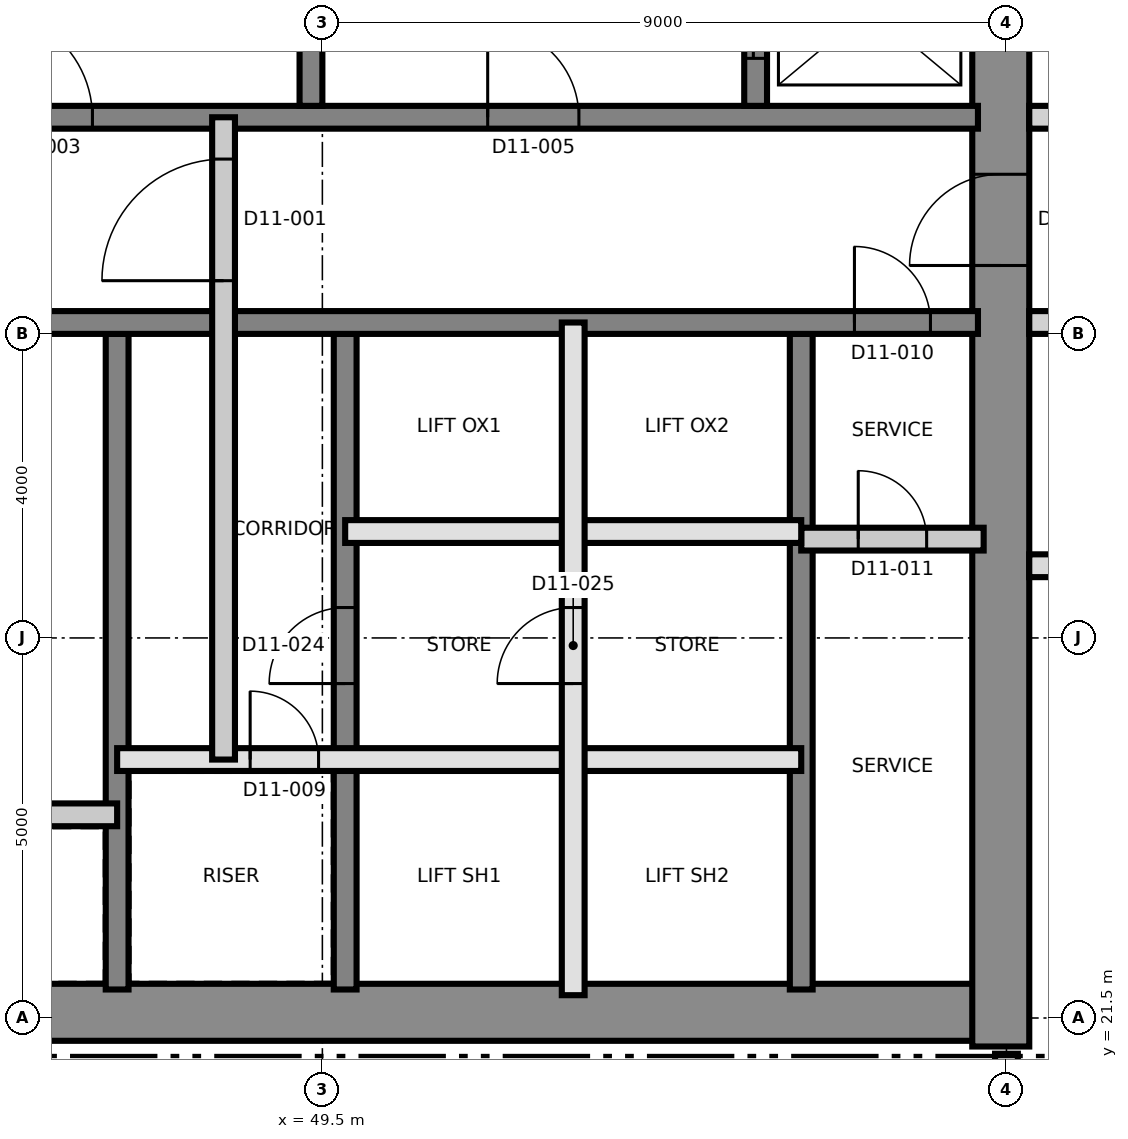
"""IFC4 building model, lengths in metres.
Left out: names, types, materials, properties, quantities, classifications, styles, units other than length and angle.
Written with IfcOpenShell. Run it as: python <this file> out.ifc"""

import sys

from ifc_helpers import new_model, si_unit, direction, frame, frame_2d, origin, place, context, subcontext, project, spatial, rectangle, extrude, element, fill, save


model = new_model("IFC4")
c1 = context("Model", 3, precision=1e-05, world=origin(), true_north=direction((0.0, 1.0)))
c2 = subcontext(c1, "Body", "Model", "MODEL_VIEW")
j1 = project(units=[si_unit("LENGTHUNIT", "METRE"), si_unit("PLANEANGLEUNIT", "RADIAN")], contexts=[c1])
p1 = place(None, origin())
s1 = spatial("IfcSite", under=j1, at=p1, CompositionType="ELEMENT")
p2 = place(p1, origin())
s2 = spatial("IfcBuilding", under=s1, at=p2, CompositionType="ELEMENT")
p3 = place(p2, frame((0.0, 0.0, 127.8)))
s3 = spatial("IfcBuildingStorey", under=s2, at=p3, CompositionType="ELEMENT", Elevation=127.8)
p4 = place(p3, frame((31.125, 21.575, 0.0), z_axis=(0.0, 0.0, 1.0), x_axis=(1.0, 0.0, 0.0)))
e1 = element("IfcWall", 1, at=p4, inside=s3, PredefinedType="SHEAR", context=c2, shape_type="SweptSolid", body=[
    extrude(rectangle(XDim=27.0, YDim=0.75, at=frame_2d((13.5, 0.0))), origin(), (0.0, 0.0, 1.0), 3.7),
])
p5 = place(p3, frame((58.425, 21.125, 0.0), z_axis=(0.0, 0.0, 1.0), x_axis=(0.0, 1.0, 0.0)))
e2 = element("IfcWall", 2, at=p5, inside=s3, PredefinedType="SHEAR", context=c2, shape_type="SweptSolid", body=[
    extrude(rectangle(XDim=18.75, YDim=0.75, at=frame_2d((9.375, 0.0))), origin(), (0.0, 0.0, 1.0), 3.7),
])
p6 = place(p5, frame((10.275, 0.0, 0.0)))
e3 = element("IfcOpeningElement", 3, at=p6, cuts=e2, PredefinedType="OPENING", context=c2, shape_type="SweptSolid", body=[
    extrude(rectangle(XDim=1.2, YDim=2.1, at=frame_2d((0.6, 1.05))), frame((0.0, 0.385, 0.0), z_axis=(0.0, -1.0, 0.0), x_axis=(1.0, 0.0, 0.0)), (0.0, 0.0, 1.0), 0.77),
])
p7 = place(p3, frame((46.8, 21.875, 0.0), z_axis=(0.0, 0.0, 1.0), x_axis=(0.0, 1.0, 0.0)))
e4 = element("IfcWall", 4, at=p7, inside=s3, PredefinedType="SHEAR", context=c2, shape_type="SweptSolid", body=[
    extrude(rectangle(XDim=8.625, YDim=0.3, at=frame_2d((4.312, 0.0))), origin(), (0.0, 0.0, 1.0), 3.7),
])
p8 = place(p3, frame((49.8, 21.875, 0.0), z_axis=(0.0, 0.0, 1.0), x_axis=(0.0, 1.0, 0.0)))
e5 = element("IfcWall", 5, at=p8, inside=s3, PredefinedType="SHEAR", context=c2, shape_type="SweptSolid", body=[
    extrude(rectangle(XDim=8.625, YDim=0.3, at=frame_2d((4.312, 0.0))), origin(), (0.0, 0.0, 1.0), 3.7),
])
p9 = place(p8, frame((4.025, 0.0, 0.0)))
e6 = element("IfcOpeningElement", 6, at=p9, cuts=e5, PredefinedType="OPENING", context=c2, shape_type="SweptSolid", body=[
    extrude(rectangle(XDim=1.0, YDim=2.1, at=frame_2d((0.5, 1.05))), frame((0.0, 0.16, 0.0), z_axis=(0.0, -1.0, 0.0), x_axis=(1.0, 0.0, 0.0)), (0.0, 0.0, 1.0), 0.32),
])
p10 = place(p3, frame((55.8, 21.875, 0.0), z_axis=(0.0, 0.0, 1.0), x_axis=(0.0, 1.0, 0.0)))
e7 = element("IfcWall", 7, at=p10, inside=s3, PredefinedType="SHEAR", context=c2, shape_type="SweptSolid", body=[
    extrude(rectangle(XDim=8.625, YDim=0.3, at=frame_2d((4.312, 0.0))), origin(), (0.0, 0.0, 1.0), 3.7),
])
p11 = place(p3, frame((31.875, 30.65, 0.0), z_axis=(0.0, 0.0, 1.0), x_axis=(1.0, 0.0, 0.0)))
e8 = element("IfcWall", 8, at=p11, inside=s3, PredefinedType="SHEAR", context=c2, shape_type="SweptSolid", body=[
    extrude(rectangle(XDim=26.25, YDim=0.3, at=frame_2d((13.125, 0.0))), origin(), (0.0, 0.0, 1.0), 3.7),
])
p12 = place(p11, frame((24.625, 0.0, 0.0)))
e9 = element("IfcOpeningElement", 9, at=p12, cuts=e8, PredefinedType="OPENING", context=c2, shape_type="SweptSolid", body=[
    extrude(rectangle(XDim=1.0, YDim=2.1, at=frame_2d((0.5, 1.05))), frame((0.0, 0.16, 0.0), z_axis=(0.0, -1.0, 0.0), x_axis=(1.0, 0.0, 0.0)), (0.0, 0.0, 1.0), 0.32),
])
p13 = place(p11, frame((11.425, 0.0, 0.0)))
e10 = element("IfcOpeningElement", 10, at=p13, cuts=e8, PredefinedType="OPENING", context=c2, shape_type="SweptSolid", body=[
    extrude(rectangle(XDim=1.0, YDim=2.1, at=frame_2d((0.5, 1.05))), frame((0.0, 0.16, 0.0), z_axis=(0.0, -1.0, 0.0), x_axis=(1.0, 0.0, 0.0)), (0.0, 0.0, 1.0), 0.32),
])
p14 = place(p3, frame((31.875, 33.35, 0.0), z_axis=(0.0, 0.0, 1.0), x_axis=(1.0, 0.0, 0.0)))
e11 = element("IfcWall", 11, at=p14, inside=s3, PredefinedType="SHEAR", context=c2, shape_type="SweptSolid", body=[
    extrude(rectangle(XDim=26.25, YDim=0.3, at=frame_2d((13.125, 0.0))), origin(), (0.0, 0.0, 1.0), 3.7),
])
p15 = place(p14, frame((13.2, 0.0, 0.0)))
e12 = element("IfcOpeningElement", 12, at=p15, cuts=e11, PredefinedType="OPENING", context=c2, shape_type="SweptSolid", body=[
    extrude(rectangle(XDim=1.4, YDim=2.1, at=frame_2d((0.7, 1.05))), frame((0.0, 0.16, 0.0), z_axis=(0.0, -1.0, 0.0), x_axis=(1.0, 0.0, 0.0)), (0.0, 0.0, 1.0), 0.32),
])
p16 = place(p14, frame((5.25, 0.0, 0.0)))
e13 = element("IfcOpeningElement", 13, at=p16, cuts=e11, PredefinedType="OPENING", context=c2, shape_type="SweptSolid", body=[
    extrude(rectangle(XDim=1.2, YDim=2.1, at=frame_2d((0.6, 1.05))), frame((0.0, 0.16, 0.0), z_axis=(0.0, -1.0, 0.0), x_axis=(1.0, 0.0, 0.0)), (0.0, 0.0, 1.0), 0.32),
])
p17 = place(p14, frame((19.8, 0.0, 0.0)))
e14 = element("IfcOpeningElement", 14, at=p17, cuts=e11, PredefinedType="OPENING", context=c2, shape_type="SweptSolid", body=[
    extrude(rectangle(XDim=1.2, YDim=2.1, at=frame_2d((0.6, 1.05))), frame((0.0, 0.16, 0.0), z_axis=(0.0, -1.0, 0.0), x_axis=(1.0, 0.0, 0.0)), (0.0, 0.0, 1.0), 0.32),
])
p18 = place(p3, frame((49.35, 33.5, 0.0), z_axis=(0.0, 0.0, 1.0), x_axis=(0.0, 1.0, 0.0)))
e15 = element("IfcWall", 15, at=p18, inside=s3, PredefinedType="SHEAR", context=c2, shape_type="SweptSolid", body=[
    extrude(rectangle(XDim=5.625, YDim=0.3, at=frame_2d((2.812, 0.0))), origin(), (0.0, 0.0, 1.0), 3.7),
])
p19 = place(p3, frame((55.2, 33.5, 0.0), z_axis=(0.0, 0.0, 1.0), x_axis=(0.0, 1.0, 0.0)))
e16 = element("IfcWall", 16, at=p19, inside=s3, PredefinedType="SHEAR", context=c2, shape_type="SweptSolid", body=[
    extrude(rectangle(XDim=2.55, YDim=0.3, at=frame_2d((1.275, 0.0))), origin(), (0.0, 0.0, 1.0), 3.7),
])
p20 = place(p19, frame((0.625, 0.0, 0.0)))
e17 = element("IfcOpeningElement", 17, at=p20, cuts=e16, PredefinedType="OPENING", context=c2, shape_type="SweptSolid", body=[
    extrude(rectangle(XDim=1.3, YDim=2.4, at=frame_2d((0.65, 1.2))), frame((0.0, 0.16, 0.0), z_axis=(0.0, -1.0, 0.0), x_axis=(1.0, 0.0, 0.0)), (0.0, 0.0, 1.0), 0.32),
])
p21 = place(p3, frame((40.8, 24.173, 0.0), z_axis=(0.0, 0.0, 1.0), x_axis=(1.0, 0.0, 0.0)))
e18 = element("IfcWall", 18, at=p21, inside=s3, PredefinedType="PARTITIONING", context=c2, shape_type="SweptSolid", body=[
    extrude(rectangle(XDim=6.0, YDim=0.3, at=frame_2d((3.0, 0.0))), origin(), (0.0, 0.0, 1.0), 3.4),
])
p22 = place(p21, frame((2.5, 0.0, 0.0)))
e19 = element("IfcOpeningElement", 19, at=p22, cuts=e18, PredefinedType="OPENING", context=c2, shape_type="SweptSolid", body=[
    extrude(rectangle(XDim=1.0, YDim=2.1, at=frame_2d((0.5, 1.05))), frame((0.0, 0.16, 0.0), z_axis=(0.0, -1.0, 0.0), x_axis=(1.0, 0.0, 0.0)), (0.0, 0.0, 1.0), 0.32),
])
p23 = place(p3, frame((46.8, 24.9, 0.0), z_axis=(0.0, 0.0, 1.0), x_axis=(1.0, 0.0, 0.0)))
e20 = element("IfcWall", 20, at=p23, inside=s3, PredefinedType="SOLIDWALL", context=c2, shape_type="SweptSolid", body=[
    extrude(rectangle(XDim=9.0, YDim=0.3, at=frame_2d((4.5, 0.0))), origin(), (0.0, 0.0, 1.0), 3.4),
])
p24 = place(p23, frame((1.75, 0.0, 0.0)))
e21 = element("IfcOpeningElement", 21, at=p24, cuts=e20, PredefinedType="OPENING", context=c2, shape_type="SweptSolid", body=[
    extrude(rectangle(XDim=0.9, YDim=2.1, at=frame_2d((0.45, 1.05))), frame((0.0, 0.16, 0.0), z_axis=(0.0, -1.0, 0.0), x_axis=(1.0, 0.0, 0.0)), (0.0, 0.0, 1.0), 0.32),
])
p25 = place(p3, frame((55.8, 27.8, 0.0), z_axis=(0.0, 0.0, 1.0), x_axis=(1.0, 0.0, 0.0)))
e22 = element("IfcWall", 22, at=p25, inside=s3, PredefinedType="PARTITIONING", context=c2, shape_type="SweptSolid", body=[
    extrude(rectangle(XDim=2.4, YDim=0.3, at=frame_2d((1.2, 0.0))), origin(), (0.0, 0.0, 1.0), 3.4),
])
p26 = place(p25, frame((0.75, 0.0, 0.0)))
e23 = element("IfcOpeningElement", 23, at=p26, cuts=e22, PredefinedType="OPENING", context=c2, shape_type="SweptSolid", body=[
    extrude(rectangle(XDim=0.9, YDim=2.1, at=frame_2d((0.45, 1.05))), frame((0.0, 0.16, 0.0), z_axis=(0.0, -1.0, 0.0), x_axis=(1.0, 0.0, 0.0)), (0.0, 0.0, 1.0), 0.32),
])
p27 = place(p3, frame((49.8, 27.9, 0.0), z_axis=(0.0, 0.0, 1.0), x_axis=(1.0, 0.0, 0.0)))
e24 = element("IfcWall", 24, at=p27, inside=s3, PredefinedType="SOLIDWALL", context=c2, shape_type="SweptSolid", body=[
    extrude(rectangle(XDim=6.0, YDim=0.3, at=frame_2d((3.0, 0.0))), origin(), (0.0, 0.0, 1.0), 3.4),
])
p28 = place(p3, frame((48.2, 24.9, 0.0), z_axis=(0.0, 0.0, 1.0), x_axis=(0.0, 1.0, 0.0)))
e25 = element("IfcWall", 25, at=p28, inside=s3, PredefinedType="PARTITIONING", context=c2, shape_type="SweptSolid", body=[
    extrude(rectangle(XDim=8.45, YDim=0.3, at=frame_2d((4.225, 0.0))), origin(), (0.0, 0.0, 1.0), 3.4),
])
p29 = place(p28, frame((6.3, 0.0, 0.0)))
e26 = element("IfcOpeningElement", 26, at=p29, cuts=e25, PredefinedType="OPENING", context=c2, shape_type="SweptSolid", body=[
    extrude(rectangle(XDim=1.6, YDim=2.1, at=frame_2d((0.8, 1.05))), frame((0.0, 0.16, 0.0), z_axis=(0.0, -1.0, 0.0), x_axis=(1.0, 0.0, 0.0)), (0.0, 0.0, 1.0), 0.32),
])
p30 = place(p3, frame((52.8, 21.8, 0.0), z_axis=(0.0, 0.0, 1.0), x_axis=(0.0, 1.0, 0.0)))
e27 = element("IfcWall", 27, at=p30, inside=s3, PredefinedType="SOLIDWALL", context=c2, shape_type="SweptSolid", body=[
    extrude(rectangle(XDim=8.85, YDim=0.3, at=frame_2d((4.425, 0.0))), origin(), (0.0, 0.0, 1.0), 3.4),
])
p31 = place(p30, frame((4.1, 0.0, 0.0)))
e28 = element("IfcOpeningElement", 28, at=p31, cuts=e27, PredefinedType="OPENING", context=c2, shape_type="SweptSolid", body=[
    extrude(rectangle(XDim=1.0, YDim=2.1, at=frame_2d((0.5, 1.05))), frame((0.0, 0.16, 0.0), z_axis=(0.0, -1.0, 0.0), x_axis=(1.0, 0.0, 0.0)), (0.0, 0.0, 1.0), 0.32),
])
p32 = place(p3, frame((58.8, 27.45, 0.0), z_axis=(0.0, 0.0, 1.0), x_axis=(1.0, 0.0, 0.0)))
e29 = element("IfcWall", 29, at=p32, inside=s3, PredefinedType="PARTITIONING", context=c2, shape_type="SweptSolid", body=[
    extrude(rectangle(XDim=2.4, YDim=0.3, at=frame_2d((1.2, 0.0))), origin(), (0.0, 0.0, 1.0), 3.4),
])
p33 = place(p32, frame((0.65, 0.0, 0.0)))
e30 = element("IfcOpeningElement", 30, at=p33, cuts=e29, PredefinedType="OPENING", context=c2, shape_type="SweptSolid", body=[
    extrude(rectangle(XDim=0.8, YDim=2.1, at=frame_2d((0.4, 1.05))), frame((0.0, 0.16, 0.0), z_axis=(0.0, -1.0, 0.0), x_axis=(1.0, 0.0, 0.0)), (0.0, 0.0, 1.0), 0.32),
])
p34 = place(p3, frame((58.8, 30.65, 0.0), z_axis=(0.0, 0.0, 1.0), x_axis=(1.0, 0.0, 0.0)))
e31 = element("IfcWall", 31, at=p34, inside=s3, PredefinedType="PARTITIONING", context=c2, shape_type="SweptSolid", body=[
    extrude(rectangle(XDim=26.53, YDim=0.3, at=frame_2d((13.265, 0.0))), origin(), (0.0, 0.0, 1.0), 3.4),
])
p35 = place(p34, frame((3.115, 0.0, 0.0)))
e32 = element("IfcOpeningElement", 32, at=p35, cuts=e31, PredefinedType="OPENING", context=c2, shape_type="SweptSolid", body=[
    extrude(rectangle(XDim=1.0, YDim=2.1, at=frame_2d((0.5, 1.05))), frame((0.0, 0.16, 0.0), z_axis=(0.0, -1.0, 0.0), x_axis=(1.0, 0.0, 0.0)), (0.0, 0.0, 1.0), 0.32),
])
p36 = place(p34, frame((6.065, 0.0, 0.0)))
e33 = element("IfcOpeningElement", 33, at=p36, cuts=e31, PredefinedType="OPENING", context=c2, shape_type="SweptSolid", body=[
    extrude(rectangle(XDim=1.4, YDim=2.1, at=frame_2d((0.7, 1.05))), frame((0.0, 0.16, 0.0), z_axis=(0.0, -1.0, 0.0), x_axis=(1.0, 0.0, 0.0)), (0.0, 0.0, 1.0), 0.32),
])
p37 = place(p34, frame((12.7, 0.0, 0.0)))
e34 = element("IfcOpeningElement", 34, at=p37, cuts=e31, PredefinedType="OPENING", context=c2, shape_type="SweptSolid", body=[
    extrude(rectangle(XDim=1.0, YDim=2.4, at=frame_2d((0.5, 1.2))), frame((0.0, 0.16, 0.0), z_axis=(0.0, -1.0, 0.0), x_axis=(1.0, 0.0, 0.0)), (0.0, 0.0, 1.0), 0.32),
])
p38 = place(p34, frame((18.85, 0.0, 0.0)))
e35 = element("IfcOpeningElement", 35, at=p38, cuts=e31, PredefinedType="OPENING", context=c2, shape_type="SweptSolid", body=[
    extrude(rectangle(XDim=1.0, YDim=2.1, at=frame_2d((0.5, 1.05))), frame((0.0, 0.16, 0.0), z_axis=(0.0, -1.0, 0.0), x_axis=(1.0, 0.0, 0.0)), (0.0, 0.0, 1.0), 0.32),
])
p39 = place(p34, frame((24.7, 0.0, 0.0)))
e36 = element("IfcOpeningElement", 36, at=p39, cuts=e31, PredefinedType="OPENING", context=c2, shape_type="SweptSolid", body=[
    extrude(rectangle(XDim=1.0, YDim=2.1, at=frame_2d((0.5, 1.05))), frame((0.0, 0.16, 0.0), z_axis=(0.0, -1.0, 0.0), x_axis=(1.0, 0.0, 0.0)), (0.0, 0.0, 1.0), 0.32),
])
p40 = place(p3, frame((58.8, 33.35, 0.0), z_axis=(0.0, 0.0, 1.0), x_axis=(1.0, 0.0, 0.0)))
e37 = element("IfcWall", 37, at=p40, inside=s3, PredefinedType="PARTITIONING", context=c2, shape_type="SweptSolid", body=[
    extrude(rectangle(XDim=26.53, YDim=0.3, at=frame_2d((13.265, 0.0))), origin(), (0.0, 0.0, 1.0), 3.4),
])
p41 = place(p40, frame((0.835, 0.0, 0.0)))
e38 = element("IfcOpeningElement", 38, at=p41, cuts=e37, PredefinedType="OPENING", context=c2, shape_type="SweptSolid", body=[
    extrude(rectangle(XDim=1.2, YDim=2.1, at=frame_2d((0.6, 1.05))), frame((0.0, 0.16, 0.0), z_axis=(0.0, -1.0, 0.0), x_axis=(1.0, 0.0, 0.0)), (0.0, 0.0, 1.0), 0.32),
])
p42 = place(p40, frame((4.085, 0.0, 0.0)))
e39 = element("IfcOpeningElement", 39, at=p42, cuts=e37, PredefinedType="OPENING", context=c2, shape_type="SweptSolid", body=[
    extrude(rectangle(XDim=1.0, YDim=2.1, at=frame_2d((0.5, 1.05))), frame((0.0, 0.16, 0.0), z_axis=(0.0, -1.0, 0.0), x_axis=(1.0, 0.0, 0.0)), (0.0, 0.0, 1.0), 0.32),
])
p43 = place(p40, frame((12.7, 0.0, 0.0)))
e40 = element("IfcOpeningElement", 40, at=p43, cuts=e37, PredefinedType="OPENING", context=c2, shape_type="SweptSolid", body=[
    extrude(rectangle(XDim=1.0, YDim=2.4, at=frame_2d((0.5, 1.2))), frame((0.0, 0.16, 0.0), z_axis=(0.0, -1.0, 0.0), x_axis=(1.0, 0.0, 0.0)), (0.0, 0.0, 1.0), 0.32),
])
p44 = place(p40, frame((21.115, 0.0, 0.0)))
e41 = element("IfcOpeningElement", 41, at=p44, cuts=e37, PredefinedType="OPENING", context=c2, shape_type="SweptSolid", body=[
    extrude(rectangle(XDim=1.0, YDim=2.1, at=frame_2d((0.5, 1.05))), frame((0.0, 0.16, 0.0), z_axis=(0.0, -1.0, 0.0), x_axis=(1.0, 0.0, 0.0)), (0.0, 0.0, 1.0), 0.32),
])
p45 = place(p40, frame((24.065, 0.0, 0.0)))
e42 = element("IfcOpeningElement", 42, at=p45, cuts=e37, PredefinedType="OPENING", context=c2, shape_type="SweptSolid", body=[
    extrude(rectangle(XDim=1.4, YDim=2.1, at=frame_2d((0.7, 1.05))), frame((0.0, 0.16, 0.0), z_axis=(0.0, -1.0, 0.0), x_axis=(1.0, 0.0, 0.0)), (0.0, 0.0, 1.0), 0.32),
])
p46 = place(p3, frame((58.5, 20.135, 0.0), z_axis=(0.0, 0.0, 1.0), x_axis=(0.0, 1.0, 0.0)))
e43 = element("IfcWall", 43, at=p46, inside=s3, PredefinedType="PARTITIONING", context=c2, shape_type="SweptSolid", body=[
    extrude(rectangle(XDim=0.895, YDim=0.3, at=frame_2d((0.448, 0.0))), origin(), (0.0, 0.0, 1.0), 3.4),
])
p47 = place(p29, origin())
e44 = element("IfcDoor", 44, at=p47, inside=s3, OperationType="SINGLE_SWING_LEFT", PredefinedType="DOOR", context=c2, shape_type="SweptSolid", body=[
    extrude(rectangle(XDim=1.6, YDim=2.1, at=frame_2d((0.8, 1.05))), frame((0.0, 0.025, 0.0), z_axis=(0.0, -1.0, 0.0), x_axis=(1.0, 0.0, 0.0)), (0.0, 0.0, 1.0), 0.05),
])
fill(e26, e44)
p48 = place(p15, origin())
e45 = element("IfcDoor", 45, at=p48, inside=s3, OperationType="SINGLE_SWING_RIGHT", PredefinedType="DOOR", context=c2, shape_type="SweptSolid", body=[
    extrude(rectangle(XDim=1.4, YDim=2.1, at=frame_2d((0.7, 1.05))), frame((0.0, 0.025, 0.0), z_axis=(0.0, -1.0, 0.0), x_axis=(1.0, 0.0, 0.0)), (0.0, 0.0, 1.0), 0.05),
])
fill(e12, e45)
p49 = place(p17, origin())
e46 = element("IfcDoor", 46, at=p49, inside=s3, OperationType="SINGLE_SWING_RIGHT", PredefinedType="DOOR", context=c2, shape_type="SweptSolid", body=[
    extrude(rectangle(XDim=1.2, YDim=2.1, at=frame_2d((0.6, 1.05))), frame((0.0, 0.025, 0.0), z_axis=(0.0, -1.0, 0.0), x_axis=(1.0, 0.0, 0.0)), (0.0, 0.0, 1.0), 0.05),
])
fill(e14, e46)
p50 = place(p24, origin())
e47 = element("IfcDoor", 47, at=p50, inside=s3, OperationType="SINGLE_SWING_RIGHT", PredefinedType="DOOR", context=c2, shape_type="SweptSolid", body=[
    extrude(rectangle(XDim=0.9, YDim=2.1, at=frame_2d((0.45, 1.05))), frame((0.0, 0.025, 0.0), z_axis=(0.0, -1.0, 0.0), x_axis=(1.0, 0.0, 0.0)), (0.0, 0.0, 1.0), 0.05),
])
fill(e21, e47)
p51 = place(p12, origin())
e48 = element("IfcDoor", 48, at=p51, inside=s3, OperationType="SINGLE_SWING_LEFT", PredefinedType="DOOR", context=c2, shape_type="SweptSolid", body=[
    extrude(rectangle(XDim=1.0, YDim=2.1, at=frame_2d((0.5, 1.05))), frame((0.0, 0.025, 0.0), z_axis=(0.0, -1.0, 0.0), x_axis=(1.0, 0.0, 0.0)), (0.0, 0.0, 1.0), 0.05),
])
fill(e9, e48)
p52 = place(p26, origin())
e49 = element("IfcDoor", 49, at=p52, inside=s3, OperationType="SINGLE_SWING_RIGHT", PredefinedType="DOOR", context=c2, shape_type="SweptSolid", body=[
    extrude(rectangle(XDim=0.9, YDim=2.1, at=frame_2d((0.45, 1.05))), frame((0.0, 0.025, 0.0), z_axis=(0.0, -1.0, 0.0), x_axis=(1.0, 0.0, 0.0)), (0.0, 0.0, 1.0), 0.05),
])
fill(e23, e49)
p53 = place(p6, origin())
e50 = element("IfcDoor", 50, at=p53, inside=s3, OperationType="SINGLE_SWING_LEFT", PredefinedType="DOOR", context=c2, shape_type="SweptSolid", body=[
    extrude(rectangle(XDim=1.2, YDim=2.1, at=frame_2d((0.6, 1.05))), frame((0.0, 0.025, 0.0), z_axis=(0.0, -1.0, 0.0), x_axis=(1.0, 0.0, 0.0)), (0.0, 0.0, 1.0), 0.05),
])
fill(e3, e50)
p54 = place(p20, origin())
e51 = element("IfcDoor", 51, at=p54, inside=s3, OperationType="SLIDING_TO_LEFT", PredefinedType="DOOR", context=c2, shape_type="SweptSolid", body=[
    extrude(rectangle(XDim=1.3, YDim=2.4, at=frame_2d((0.65, 1.2))), frame((0.0, 0.025, 0.0), z_axis=(0.0, -1.0, 0.0), x_axis=(1.0, 0.0, 0.0)), (0.0, 0.0, 1.0), 0.05),
])
fill(e17, e51)
p55 = place(p9, origin())
e52 = element("IfcDoor", 52, at=p55, inside=s3, OperationType="SINGLE_SWING_LEFT", PredefinedType="DOOR", context=c2, shape_type="SweptSolid", body=[
    extrude(rectangle(XDim=1.0, YDim=2.1, at=frame_2d((0.5, 1.05))), frame((0.0, 0.025, 0.0), z_axis=(0.0, -1.0, 0.0), x_axis=(1.0, 0.0, 0.0)), (0.0, 0.0, 1.0), 0.05),
])
fill(e6, e52)
p56 = place(p31, origin())
e53 = element("IfcDoor", 53, at=p56, inside=s3, OperationType="SINGLE_SWING_RIGHT", PredefinedType="DOOR", context=c2, shape_type="SweptSolid", body=[
    extrude(rectangle(XDim=1.0, YDim=2.1, at=frame_2d((0.5, 1.05))), frame((0.0, 0.025, 0.0), z_axis=(0.0, -1.0, 0.0), x_axis=(1.0, 0.0, 0.0)), (0.0, 0.0, 1.0), 0.05),
])
fill(e28, e53)
save(model, sys.argv[1])
